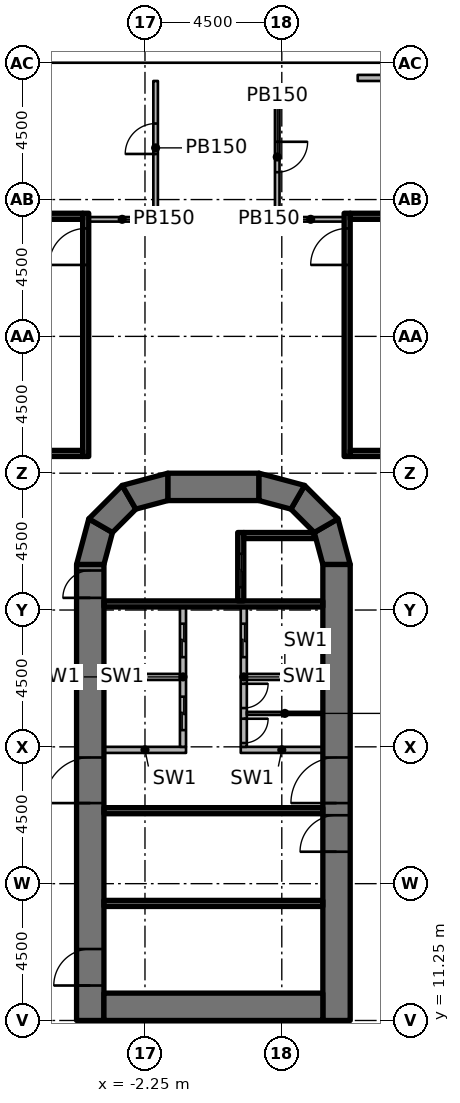
"""IFC4 building model, lengths in metres.
Left out: names, types, materials, properties, quantities, classifications, styles, units other than length and angle.
Written with IfcOpenShell. Run it as: python <this file> out.ifc"""

import sys

from ifc_helpers import new_model, si_unit, direction, frame, frame_2d, origin, origin_2d, place, context, subcontext, project, spatial, polyline, rectangle, outline, extrude, element, fill, save


model = new_model("IFC4")
c1 = context("Model", 3, precision=1e-05, world=origin(), true_north=direction((0.0, 1.0)))
c2 = subcontext(c1, "Body", "Model", "MODEL_VIEW")
j1 = project(units=[si_unit("LENGTHUNIT", "METRE"), si_unit("PLANEANGLEUNIT", "RADIAN")], contexts=[c1])
p1 = place(None, origin())
s1 = spatial("IfcSite", under=j1, at=p1, CompositionType="ELEMENT")
p2 = place(p1, origin())
s2 = spatial("IfcBuilding", under=s1, at=p2, CompositionType="ELEMENT")
p3 = place(p2, frame((0.0, 0.0, 17.0)))
s3 = spatial("IfcBuildingStorey", under=s2, at=p3, CompositionType="ELEMENT", Elevation=17.0)
for number, where, z_axis, x_axis in (
    (1, (-2.25, 33.11, 0.0), (0.0, 0.0, 1.0), (1.0, 0.0, 0.0)),
    (2, (2.25, 33.11, 0.0), (0.0, 0.0, 1.0), (1.0, 0.0, 0.0)),
    (3, (2.25, 42.15, 0.0), (0.0, 0.0, 1.0), (1.0, 0.0, 0.0)),
):
    element("IfcColumn", number, at=place(p3, frame(where, z_axis=z_axis, x_axis=x_axis)), inside=s3, PredefinedType="COLUMN", context=c2, shape_type="SweptSolid", body=[
        extrude(rectangle(XDim=1.2, YDim=1.2, at=origin_2d()), origin(), (0.0, 0.0, 1.0), 4.55),
    ])
p4 = place(p3, frame((-4.05, 11.25, 0.0), z_axis=(0.0, 0.0, 1.0), x_axis=(0.0, 1.0, 0.0)))
e4 = element("IfcWall", 4, at=p4, inside=s3, PredefinedType="SHEAR", context=c2, shape_type="SweptSolid", body=[
    extrude(rectangle(XDim=15.0, YDim=0.9, at=frame_2d((7.5, 0.0))), origin(), (0.0, 0.0, 1.0), 5.0),
])
p5 = place(p4, frame((7.15, 0.0, 0.0)))
e5 = element("IfcOpeningElement", 5, at=p5, cuts=e4, PredefinedType="OPENING", context=c2, shape_type="SweptSolid", body=[
    extrude(rectangle(XDim=1.5, YDim=2.3, at=frame_2d((0.75, 1.15))), frame((0.0, 0.46, 0.0), z_axis=(0.0, -1.0, 0.0), x_axis=(1.0, 0.0, 0.0)), (0.0, 0.0, 1.0), 0.92),
])
p6 = place(p4, frame((13.9, 0.0, 0.0)))
e6 = element("IfcOpeningElement", 6, at=p6, cuts=e4, PredefinedType="OPENING", context=c2, shape_type="SweptSolid", body=[
    extrude(rectangle(XDim=0.9, YDim=2.1, at=frame_2d((0.45, 1.05))), frame((0.0, 0.46, 0.0), z_axis=(0.0, -1.0, 0.0), x_axis=(1.0, 0.0, 0.0)), (0.0, 0.0, 1.0), 0.92),
])
p7 = place(p4, frame((1.15, 0.0, 0.0)))
e7 = element("IfcOpeningElement", 7, at=p7, cuts=e4, PredefinedType="OPENING", context=c2, shape_type="SweptSolid", body=[
    extrude(rectangle(XDim=1.2, YDim=2.1, at=frame_2d((0.6, 1.05))), frame((0.0, 0.46, 0.0), z_axis=(0.0, -1.0, 0.0), x_axis=(1.0, 0.0, 0.0)), (0.0, 0.0, 1.0), 0.92),
])
p8 = place(p3, frame((4.05, 11.25, 0.0), z_axis=(0.0, 0.0, 1.0), x_axis=(0.0, 1.0, 0.0)))
e8 = element("IfcWall", 8, at=p8, inside=s3, PredefinedType="SHEAR", context=c2, shape_type="SweptSolid", body=[
    extrude(rectangle(XDim=15.0, YDim=0.9, at=frame_2d((7.5, 0.0))), origin(), (0.0, 0.0, 1.0), 5.0),
])
p9 = place(p8, frame((7.15, 0.0, 0.0)))
e9 = element("IfcOpeningElement", 9, at=p9, cuts=e8, PredefinedType="OPENING", context=c2, shape_type="SweptSolid", body=[
    extrude(rectangle(XDim=1.5, YDim=2.3, at=frame_2d((0.75, 1.15))), frame((0.0, 0.46, 0.0), z_axis=(0.0, -1.0, 0.0), x_axis=(1.0, 0.0, 0.0)), (0.0, 0.0, 1.0), 0.92),
])
p10 = place(p8, frame((5.55, 0.0, 0.0)))
e10 = element("IfcOpeningElement", 10, at=p10, cuts=e8, PredefinedType="OPENING", context=c2, shape_type="SweptSolid", body=[
    extrude(rectangle(XDim=1.2, YDim=2.1, at=frame_2d((0.6, 1.05))), frame((0.0, 0.46, 0.0), z_axis=(0.0, -1.0, 0.0), x_axis=(1.0, 0.0, 0.0)), (0.0, 0.0, 1.0), 0.92),
])
p11 = place(p3, frame((-3.6, 11.7, 0.0), z_axis=(0.0, 0.0, 1.0), x_axis=(1.0, 0.0, 0.0)))
e11 = element("IfcWall", 11, at=p11, inside=s3, PredefinedType="SHEAR", context=c2, shape_type="SweptSolid", body=[
    extrude(rectangle(XDim=7.2, YDim=0.9, at=frame_2d((3.6, 0.0))), origin(), (0.0, 0.0, 1.0), 5.0),
])
p12 = place(p3, frame((-1.5, 28.8, 0.0), z_axis=(0.0, 0.0, 1.0), x_axis=(1.0, 0.0, 0.0)))
e12 = element("IfcWall", 12, at=p12, inside=s3, PredefinedType="SHEAR", context=c2, shape_type="SweptSolid", body=[
    extrude(rectangle(XDim=3.0, YDim=0.9, at=frame_2d((1.5, 0.0))), origin(), (0.0, 0.0, 1.0), 5.0),
])
p13 = place(p3, origin())
e13 = element("IfcWall", 13, at=p13, inside=s3, PredefinedType="SHEAR", context=c2, shape_type="SweptSolid", body=[
    extrude(outline(polyline([(-4.5, 26.25), (-4.098, 27.75), (-3.319, 27.3), (-3.6, 26.25), (-4.5, 26.25)])), origin(), (0.0, 0.0, 1.0), 5.0),
])
p14 = place(p3, origin())
e14 = element("IfcWall", 14, at=p14, inside=s3, PredefinedType="SHEAR", context=c2, shape_type="SweptSolid", body=[
    extrude(outline(polyline([(-4.098, 27.75), (-3.0, 28.848), (-2.55, 28.069), (-3.319, 27.3), (-4.098, 27.75)])), origin(), (0.0, 0.0, 1.0), 5.0),
])
p15 = place(p3, origin())
e15 = element("IfcWall", 15, at=p15, inside=s3, PredefinedType="SHEAR", context=c2, shape_type="SweptSolid", body=[
    extrude(outline(polyline([(-3.0, 28.848), (-1.5, 29.25), (-1.5, 28.35), (-2.55, 28.069), (-3.0, 28.848)])), origin(), (0.0, 0.0, 1.0), 5.0),
])
p16 = place(p3, origin())
e16 = element("IfcWall", 16, at=p16, inside=s3, PredefinedType="SHEAR", context=c2, shape_type="SweptSolid", body=[
    extrude(outline(polyline([(4.5, 26.25), (4.098, 27.75), (3.319, 27.3), (3.6, 26.25), (4.5, 26.25)])), origin(), (0.0, 0.0, 1.0), 5.0),
])
p17 = place(p3, origin())
e17 = element("IfcWall", 17, at=p17, inside=s3, PredefinedType="SHEAR", context=c2, shape_type="SweptSolid", body=[
    extrude(outline(polyline([(4.098, 27.75), (3.0, 28.848), (2.55, 28.069), (3.319, 27.3), (4.098, 27.75)])), origin(), (0.0, 0.0, 1.0), 5.0),
])
p18 = place(p3, origin())
e18 = element("IfcWall", 18, at=p18, inside=s3, PredefinedType="SHEAR", context=c2, shape_type="SweptSolid", body=[
    extrude(outline(polyline([(3.0, 28.848), (1.5, 29.25), (1.5, 28.35), (2.55, 28.069), (3.0, 28.848)])), origin(), (0.0, 0.0, 1.0), 5.0),
])
p19 = place(p3, frame((9.327, 42.25, 0.0), z_axis=(0.0, 0.0, 1.0), x_axis=(-1.0, 0.0, 0.0)))
e19 = element("IfcWall", 19, at=p19, inside=s3, PredefinedType="SOLIDWALL", context=c2, shape_type="SweptSolid", body=[
    extrude(rectangle(XDim=4.58, YDim=0.2, at=frame_2d((2.29, 0.0))), origin(), (0.0, 0.0, 1.0), 4.55),
])
p20 = place(p19, frame((1.39, 0.0, 0.0)))
e20 = element("IfcOpeningElement", 20, at=p20, cuts=e19, PredefinedType="OPENING", context=c2, shape_type="SweptSolid", body=[
    extrude(rectangle(XDim=1.8, YDim=2.4, at=frame_2d((0.9, 1.2))), frame((0.0, 0.11, 0.0), z_axis=(0.0, -1.0, 0.0), x_axis=(1.0, 0.0, 0.0)), (0.0, 0.0, 1.0), 0.22),
])
p21 = place(p3, frame((-3.6, 24.95, 0.0), z_axis=(0.0, 0.0, 1.0), x_axis=(1.0, 0.0, 0.0)))
e21 = element("IfcWall", 21, at=p21, inside=s3, PredefinedType="SHEAR", context=c2, shape_type="SweptSolid", body=[
    extrude(rectangle(XDim=7.2, YDim=0.2, at=frame_2d((3.6, 0.0))), origin(), (0.0, 0.0, 1.0), 4.55),
])
p22 = place(p3, frame((0.9, 27.3, 0.0), z_axis=(0.0, 0.0, 1.0), x_axis=(0.0, -1.0, 0.0)))
e22 = element("IfcWall", 22, at=p22, inside=s3, PredefinedType="SHEAR", context=c2, shape_type="SweptSolid", body=[
    extrude(rectangle(XDim=2.25, YDim=0.2, at=frame_2d((1.125, 0.0))), origin(), (0.0, 0.0, 1.0), 4.55),
])
p23 = place(p22, frame((0.7, 0.0, 0.0)))
e23 = element("IfcOpeningElement", 23, at=p23, cuts=e22, PredefinedType="OPENING", context=c2, shape_type="SweptSolid", body=[
    extrude(rectangle(XDim=1.1, YDim=2.3, at=frame_2d((0.55, 1.15))), frame((0.0, 0.11, 0.0), z_axis=(0.0, -1.0, 0.0), x_axis=(1.0, 0.0, 0.0)), (0.0, 0.0, 1.0), 0.22),
])
p24 = place(p3, origin())
e24 = element("IfcWall", 24, at=p24, inside=s3, PredefinedType="SHEAR", context=c2, shape_type="SweptSolid", body=[
    extrude(outline(polyline([(1.0, 27.1), (3.341, 27.1), (3.291, 27.284), (3.275, 27.3), (1.0, 27.3), (1.0, 27.1)])), origin(), (0.0, 0.0, 1.0), 4.55),
])
for number, where, z_axis, x_axis in (
    (25, (-3.6, 18.15, 0.0), (0.0, 0.0, 1.0), (1.0, 0.0, 0.0)),
    (26, (-3.6, 15.1, 0.0), (0.0, 0.0, 1.0), (1.0, 0.0, 0.0)),
):
    element("IfcWall", number, at=place(p3, frame(where, z_axis=z_axis, x_axis=x_axis)), inside=s3, PredefinedType="SHEAR", context=c2, shape_type="SweptSolid", body=[
        extrude(rectangle(XDim=7.2, YDim=0.2, at=frame_2d((3.6, 0.0))), origin(), (0.0, 0.0, 1.0), 4.55),
    ])
p25 = place(p3, frame((-3.6, 20.15, 0.0), z_axis=(0.0, 0.0, 1.0), x_axis=(1.0, 0.0, 0.0)))
e27 = element("IfcWall", 27, at=p25, inside=s3, PredefinedType="PARTITIONING", context=c2, shape_type="SweptSolid", body=[
    extrude(rectangle(XDim=2.7, YDim=0.2, at=frame_2d((1.35, 0.0))), origin(), (0.0, 0.0, 1.0), 4.55),
])
p26 = place(p3, frame((-1.0, 24.85, 0.0), z_axis=(0.0, 0.0, 1.0), x_axis=(0.0, -1.0, 0.0)))
e28 = element("IfcWall", 28, at=p26, inside=s3, PredefinedType="PARTITIONING", context=c2, shape_type="SweptSolid", body=[
    extrude(rectangle(XDim=4.6, YDim=0.2, at=frame_2d((2.3, 0.0))), origin(), (0.0, 0.0, 1.0), 4.55),
])
p27 = place(p26, frame((0.55, 0.0, 0.0)))
e29 = element("IfcOpeningElement", 29, at=p27, cuts=e28, PredefinedType="OPENING", context=c2, shape_type="SweptSolid", body=[
    extrude(rectangle(XDim=1.1, YDim=2.3, at=frame_2d((0.55, 1.15))), frame((0.0, 0.11, 0.0), z_axis=(0.0, -1.0, 0.0), x_axis=(1.0, 0.0, 0.0)), (0.0, 0.0, 1.0), 0.22),
])
p28 = place(p26, frame((2.95, 0.0, 0.0)))
e30 = element("IfcOpeningElement", 30, at=p28, cuts=e28, PredefinedType="OPENING", context=c2, shape_type="SweptSolid", body=[
    extrude(rectangle(XDim=1.1, YDim=2.3, at=frame_2d((0.55, 1.15))), frame((0.0, 0.11, 0.0), z_axis=(0.0, -1.0, 0.0), x_axis=(1.0, 0.0, 0.0)), (0.0, 0.0, 1.0), 0.22),
])
p29 = place(p3, frame((0.9, 20.15, 0.0), z_axis=(0.0, 0.0, 1.0), x_axis=(1.0, 0.0, 0.0)))
e31 = element("IfcWall", 31, at=p29, inside=s3, PredefinedType="PARTITIONING", context=c2, shape_type="SweptSolid", body=[
    extrude(rectangle(XDim=2.7, YDim=0.2, at=frame_2d((1.35, 0.0))), origin(), (0.0, 0.0, 1.0), 4.55),
])
p30 = place(p3, frame((1.0, 24.85, 0.0), z_axis=(0.0, 0.0, 1.0), x_axis=(0.0, -1.0, 0.0)))
e32 = element("IfcWall", 32, at=p30, inside=s3, PredefinedType="PARTITIONING", context=c2, shape_type="SweptSolid", body=[
    extrude(rectangle(XDim=4.6, YDim=0.2, at=frame_2d((2.3, 0.0))), origin(), (0.0, 0.0, 1.0), 4.55),
])
p31 = place(p30, frame((0.55, 0.0, 0.0)))
e33 = element("IfcOpeningElement", 33, at=p31, cuts=e32, PredefinedType="OPENING", context=c2, shape_type="SweptSolid", body=[
    extrude(rectangle(XDim=1.1, YDim=2.3, at=frame_2d((0.55, 1.15))), frame((0.0, 0.11, 0.0), z_axis=(0.0, -1.0, 0.0), x_axis=(1.0, 0.0, 0.0)), (0.0, 0.0, 1.0), 0.22),
])
p32 = place(p30, frame((2.525, 0.0, 0.0)))
e34 = element("IfcOpeningElement", 34, at=p32, cuts=e32, PredefinedType="OPENING", context=c2, shape_type="SweptSolid", body=[
    extrude(rectangle(XDim=0.8, YDim=2.1, at=frame_2d((0.4, 1.05))), frame((0.0, 0.11, 0.0), z_axis=(0.0, -1.0, 0.0), x_axis=(1.0, 0.0, 0.0)), (0.0, 0.0, 1.0), 0.22),
])
p33 = place(p30, frame((3.675, 0.0, 0.0)))
e35 = element("IfcOpeningElement", 35, at=p33, cuts=e32, PredefinedType="OPENING", context=c2, shape_type="SweptSolid", body=[
    extrude(rectangle(XDim=0.8, YDim=2.1, at=frame_2d((0.4, 1.05))), frame((0.0, 0.11, 0.0), z_axis=(0.0, -1.0, 0.0), x_axis=(1.0, 0.0, 0.0)), (0.0, 0.0, 1.0), 0.22),
])
for number, where, z_axis, x_axis in (
    (36, (-3.6, 22.55, 0.0), (0.0, 0.0, 1.0), (1.0, 0.0, 0.0)),
    (37, (1.1, 22.55, 0.0), (0.0, 0.0, 1.0), (1.0, 0.0, 0.0)),
):
    element("IfcWall", number, at=place(p3, frame(where, z_axis=z_axis, x_axis=x_axis)), inside=s3, PredefinedType="PARTITIONING", context=c2, shape_type="SweptSolid", body=[
        extrude(rectangle(XDim=2.5, YDim=0.2, at=frame_2d((1.25, 0.0))), origin(), (0.0, 0.0, 1.0), 4.55),
    ])
p34 = place(p3, frame((1.1, 21.35, 0.0), z_axis=(0.0, 0.0, 1.0), x_axis=(1.0, 0.0, 0.0)))
e38 = element("IfcWall", 38, at=p34, inside=s3, PredefinedType="PARTITIONING", context=c2, shape_type="SweptSolid", body=[
    extrude(rectangle(XDim=2.5, YDim=0.1, at=frame_2d((1.25, 0.0))), origin(), (0.0, 0.0, 1.0), 4.55),
])
p35 = place(p3, frame((-4.2, 29.8, 0.0), z_axis=(0.0, 0.0, 1.0), x_axis=(0.0, 1.0, 0.0)))
e39 = element("IfcWall", 39, at=p35, inside=s3, PredefinedType="SHEAR", context=c2, shape_type="SweptSolid", body=[
    extrude(rectangle(XDim=8.0, YDim=0.2, at=frame_2d((4.0, 0.0))), origin(), (0.0, 0.0, 1.0), 4.55),
])
p36 = place(p35, frame((6.3, 0.0, 0.0)))
e40 = element("IfcOpeningElement", 40, at=p36, cuts=e39, PredefinedType="OPENING", context=c2, shape_type="SweptSolid", body=[
    extrude(rectangle(XDim=1.2, YDim=2.1, at=frame_2d((0.6, 1.05))), frame((0.0, 0.11, 0.0), z_axis=(0.0, -1.0, 0.0), x_axis=(1.0, 0.0, 0.0)), (0.0, 0.0, 1.0), 0.22),
])
for number, where, z_axis, x_axis in (
    (41, (-8.5, 29.9, 0.0), (0.0, 0.0, 1.0), (1.0, 0.0, 0.0)),
    (42, (-8.5, 37.7, 0.0), (0.0, 0.0, 1.0), (1.0, 0.0, 0.0)),
):
    element("IfcWall", number, at=place(p3, frame(where, z_axis=z_axis, x_axis=x_axis)), inside=s3, PredefinedType="SHEAR", context=c2, shape_type="SweptSolid", body=[
        extrude(rectangle(XDim=4.2, YDim=0.2, at=frame_2d((2.1, 0.0))), origin(), (0.0, 0.0, 1.0), 4.55),
    ])
p37 = place(p3, frame((4.4, 29.8, 0.0), z_axis=(0.0, 0.0, 1.0), x_axis=(0.0, 1.0, 0.0)))
e43 = element("IfcWall", 43, at=p37, inside=s3, PredefinedType="SHEAR", context=c2, shape_type="SweptSolid", body=[
    extrude(rectangle(XDim=8.0, YDim=0.2, at=frame_2d((4.0, 0.0))), origin(), (0.0, 0.0, 1.0), 4.55),
])
p38 = place(p37, frame((6.3, 0.0, 0.0)))
e44 = element("IfcOpeningElement", 44, at=p38, cuts=e43, PredefinedType="OPENING", context=c2, shape_type="SweptSolid", body=[
    extrude(rectangle(XDim=1.2, YDim=2.1, at=frame_2d((0.6, 1.05))), frame((0.0, 0.11, 0.0), z_axis=(0.0, -1.0, 0.0), x_axis=(1.0, 0.0, 0.0)), (0.0, 0.0, 1.0), 0.22),
])
for number, where, z_axis, x_axis in (
    (45, (4.5, 29.9, 0.0), (0.0, 0.0, 1.0), (1.0, 0.0, 0.0)),
    (46, (4.5, 37.7, 0.0), (0.0, 0.0, 1.0), (1.0, 0.0, 0.0)),
):
    element("IfcWall", number, at=place(p3, frame(where, z_axis=z_axis, x_axis=x_axis)), inside=s3, PredefinedType="SHEAR", context=c2, shape_type="SweptSolid", body=[
        extrude(rectangle(XDim=4.2, YDim=0.2, at=frame_2d((2.1, 0.0))), origin(), (0.0, 0.0, 1.0), 4.55),
    ])
p39 = place(p3, frame((-4.1, 37.6, 0.0), z_axis=(0.0, 0.0, 1.0), x_axis=(1.0, 0.0, 0.0)))
e47 = element("IfcWall", 47, at=p39, inside=s3, PredefinedType="PARTITIONING", context=c2, shape_type="SweptSolid", body=[
    extrude(rectangle(XDim=2.2, YDim=0.15, at=frame_2d((1.1, 0.0))), origin(), (0.0, 0.0, 1.0), 4.55),
])
p40 = place(p3, frame((2.1, 37.6, 0.0), z_axis=(0.0, 0.0, 1.0), x_axis=(1.0, 0.0, 0.0)))
e48 = element("IfcWall", 48, at=p40, inside=s3, PredefinedType="PARTITIONING", context=c2, shape_type="SweptSolid", body=[
    extrude(rectangle(XDim=2.2, YDim=0.15, at=frame_2d((1.1, 0.0))), origin(), (0.0, 0.0, 1.0), 4.55),
])
p41 = place(p3, frame((2.1, 41.55, 0.0), z_axis=(0.0, 0.0, 1.0), x_axis=(0.0, -1.0, 0.0)))
e49 = element("IfcWall", 49, at=p41, inside=s3, PredefinedType="PARTITIONING", context=c2, shape_type="SweptSolid", body=[
    extrude(rectangle(XDim=3.8, YDim=0.15, at=frame_2d((1.9, 0.0))), origin(), (0.0, 0.0, 1.0), 4.55),
])
p42 = place(p41, frame((1.4, 0.0, 0.0)))
e50 = element("IfcOpeningElement", 50, at=p42, cuts=e49, PredefinedType="OPENING", context=c2, shape_type="SweptSolid", body=[
    extrude(rectangle(XDim=1.0, YDim=2.1, at=frame_2d((0.5, 1.05))), frame((0.0, 0.085, 0.0), z_axis=(0.0, -1.0, 0.0), x_axis=(1.0, 0.0, 0.0)), (0.0, 0.0, 1.0), 0.17),
])
p43 = place(p3, frame((-1.9, 37.75, 0.0), z_axis=(0.0, 0.0, 1.0), x_axis=(0.0, 1.0, 0.0)))
e51 = element("IfcWall", 51, at=p43, inside=s3, PredefinedType="PARTITIONING", context=c2, shape_type="SweptSolid", body=[
    extrude(rectangle(XDim=4.4, YDim=0.15, at=frame_2d((2.2, 0.0))), origin(), (0.0, 0.0, 1.0), 4.55),
])
p44 = place(p43, frame((2.0, 0.0, 0.0)))
e52 = element("IfcOpeningElement", 52, at=p44, cuts=e51, PredefinedType="OPENING", context=c2, shape_type="SweptSolid", body=[
    extrude(rectangle(XDim=1.0, YDim=2.1, at=frame_2d((0.5, 1.05))), frame((0.0, 0.085, 0.0), z_axis=(0.0, -1.0, 0.0), x_axis=(1.0, 0.0, 0.0)), (0.0, 0.0, 1.0), 0.17),
])
p45 = place(p5, origin())
e53 = element("IfcDoor", 53, at=p45, inside=s3, OperationType="DOUBLE_DOOR_SINGLE_SWING", PredefinedType="DOOR", context=c2, shape_type="SweptSolid", body=[
    extrude(rectangle(XDim=1.5, YDim=2.3, at=frame_2d((0.75, 1.15))), frame((0.0, 0.025, 0.0), z_axis=(0.0, -1.0, 0.0), x_axis=(1.0, 0.0, 0.0)), (0.0, 0.0, 1.0), 0.05),
])
fill(e5, e53)
p46 = place(p9, origin())
e54 = element("IfcDoor", 54, at=p46, inside=s3, OperationType="DOUBLE_DOOR_SINGLE_SWING", PredefinedType="DOOR", context=c2, shape_type="SweptSolid", body=[
    extrude(rectangle(XDim=1.5, YDim=2.3, at=frame_2d((0.75, 1.15))), frame((0.0, 0.025, 0.0), z_axis=(0.0, -1.0, 0.0), x_axis=(1.0, 0.0, 0.0)), (0.0, 0.0, 1.0), 0.05),
])
fill(e9, e54)
p47 = place(p6, origin())
e55 = element("IfcDoor", 55, at=p47, inside=s3, OperationType="SINGLE_SWING_LEFT", PredefinedType="DOOR", context=c2, shape_type="SweptSolid", body=[
    extrude(rectangle(XDim=0.9, YDim=2.1, at=frame_2d((0.45, 1.05))), frame((0.0, 0.025, 0.0), z_axis=(0.0, -1.0, 0.0), x_axis=(1.0, 0.0, 0.0)), (0.0, 0.0, 1.0), 0.05),
])
fill(e6, e55)
p48 = place(p10, origin())
e56 = element("IfcDoor", 56, at=p48, inside=s3, OperationType="SINGLE_SWING_LEFT", PredefinedType="DOOR", context=c2, shape_type="SweptSolid", body=[
    extrude(rectangle(XDim=1.2, YDim=2.1, at=frame_2d((0.6, 1.05))), frame((0.0, 0.025, 0.0), z_axis=(0.0, -1.0, 0.0), x_axis=(1.0, 0.0, 0.0)), (0.0, 0.0, 1.0), 0.05),
])
fill(e10, e56)
p49 = place(p7, origin())
e57 = element("IfcDoor", 57, at=p49, inside=s3, OperationType="SINGLE_SWING_RIGHT", PredefinedType="DOOR", context=c2, shape_type="SweptSolid", body=[
    extrude(rectangle(XDim=1.2, YDim=2.1, at=frame_2d((0.6, 1.05))), frame((0.0, 0.025, 0.0), z_axis=(0.0, -1.0, 0.0), x_axis=(1.0, 0.0, 0.0)), (0.0, 0.0, 1.0), 0.05),
])
fill(e7, e57)
p50 = place(p23, origin())
e58 = element("IfcDoor", 58, at=p50, inside=s3, OperationType="DOUBLE_DOOR_SLIDING", PredefinedType="DOOR", context=c2, shape_type="SweptSolid", body=[
    extrude(rectangle(XDim=1.1, YDim=2.3, at=frame_2d((0.55, 1.15))), frame((0.0, 0.025, 0.0), z_axis=(0.0, -1.0, 0.0), x_axis=(1.0, 0.0, 0.0)), (0.0, 0.0, 1.0), 0.05),
])
fill(e23, e58)
p51 = place(p27, origin())
e59 = element("IfcDoor", 59, at=p51, inside=s3, OperationType="DOUBLE_DOOR_SLIDING", PredefinedType="DOOR", context=c2, shape_type="SweptSolid", body=[
    extrude(rectangle(XDim=1.1, YDim=2.3, at=frame_2d((0.55, 1.15))), frame((0.0, 0.025, 0.0), z_axis=(0.0, -1.0, 0.0), x_axis=(1.0, 0.0, 0.0)), (0.0, 0.0, 1.0), 0.05),
])
fill(e29, e59)
p52 = place(p28, origin())
e60 = element("IfcDoor", 60, at=p52, inside=s3, OperationType="DOUBLE_DOOR_SLIDING", PredefinedType="DOOR", context=c2, shape_type="SweptSolid", body=[
    extrude(rectangle(XDim=1.1, YDim=2.3, at=frame_2d((0.55, 1.15))), frame((0.0, 0.025, 0.0), z_axis=(0.0, -1.0, 0.0), x_axis=(1.0, 0.0, 0.0)), (0.0, 0.0, 1.0), 0.05),
])
fill(e30, e60)
p53 = place(p31, origin())
e61 = element("IfcDoor", 61, at=p53, inside=s3, OperationType="DOUBLE_DOOR_SLIDING", PredefinedType="DOOR", context=c2, shape_type="SweptSolid", body=[
    extrude(rectangle(XDim=1.1, YDim=2.3, at=frame_2d((0.55, 1.15))), frame((0.0, 0.025, 0.0), z_axis=(0.0, -1.0, 0.0), x_axis=(1.0, 0.0, 0.0)), (0.0, 0.0, 1.0), 0.05),
])
fill(e33, e61)
p54 = place(p32, origin())
e62 = element("IfcDoor", 62, at=p54, inside=s3, OperationType="SINGLE_SWING_RIGHT", PredefinedType="DOOR", context=c2, shape_type="SweptSolid", body=[
    extrude(rectangle(XDim=0.8, YDim=2.1, at=frame_2d((0.4, 1.05))), frame((0.0, 0.025, 0.0), z_axis=(0.0, -1.0, 0.0), x_axis=(1.0, 0.0, 0.0)), (0.0, 0.0, 1.0), 0.05),
])
fill(e34, e62)
p55 = place(p33, origin())
e63 = element("IfcDoor", 63, at=p55, inside=s3, OperationType="SINGLE_SWING_RIGHT", PredefinedType="DOOR", context=c2, shape_type="SweptSolid", body=[
    extrude(rectangle(XDim=0.8, YDim=2.1, at=frame_2d((0.4, 1.05))), frame((0.0, 0.025, 0.0), z_axis=(0.0, -1.0, 0.0), x_axis=(1.0, 0.0, 0.0)), (0.0, 0.0, 1.0), 0.05),
])
fill(e35, e63)
p56 = place(p36, origin())
e64 = element("IfcDoor", 64, at=p56, inside=s3, OperationType="SINGLE_SWING_RIGHT", PredefinedType="DOOR", context=c2, shape_type="SweptSolid", body=[
    extrude(rectangle(XDim=1.2, YDim=2.1, at=frame_2d((0.6, 1.05))), frame((0.0, 0.025, 0.0), z_axis=(0.0, -1.0, 0.0), x_axis=(1.0, 0.0, 0.0)), (0.0, 0.0, 1.0), 0.05),
])
fill(e40, e64)
p57 = place(p38, origin())
e65 = element("IfcDoor", 65, at=p57, inside=s3, OperationType="SINGLE_SWING_LEFT", PredefinedType="DOOR", context=c2, shape_type="SweptSolid", body=[
    extrude(rectangle(XDim=1.2, YDim=2.1, at=frame_2d((0.6, 1.05))), frame((0.0, 0.025, 0.0), z_axis=(0.0, -1.0, 0.0), x_axis=(1.0, 0.0, 0.0)), (0.0, 0.0, 1.0), 0.05),
])
fill(e44, e65)
p58 = place(p42, origin())
e66 = element("IfcDoor", 66, at=p58, inside=s3, OperationType="SINGLE_SWING_LEFT", PredefinedType="DOOR", context=c2, shape_type="SweptSolid", body=[
    extrude(rectangle(XDim=1.0, YDim=2.1, at=frame_2d((0.5, 1.05))), frame((0.0, 0.025, 0.0), z_axis=(0.0, -1.0, 0.0), x_axis=(1.0, 0.0, 0.0)), (0.0, 0.0, 1.0), 0.05),
])
fill(e50, e66)
p59 = place(p44, origin())
e67 = element("IfcDoor", 67, at=p59, inside=s3, OperationType="SINGLE_SWING_LEFT", PredefinedType="DOOR", context=c2, shape_type="SweptSolid", body=[
    extrude(rectangle(XDim=1.0, YDim=2.1, at=frame_2d((0.5, 1.05))), frame((0.0, 0.025, 0.0), z_axis=(0.0, -1.0, 0.0), x_axis=(1.0, 0.0, 0.0)), (0.0, 0.0, 1.0), 0.05),
])
fill(e52, e67)
save(model, sys.argv[1])
